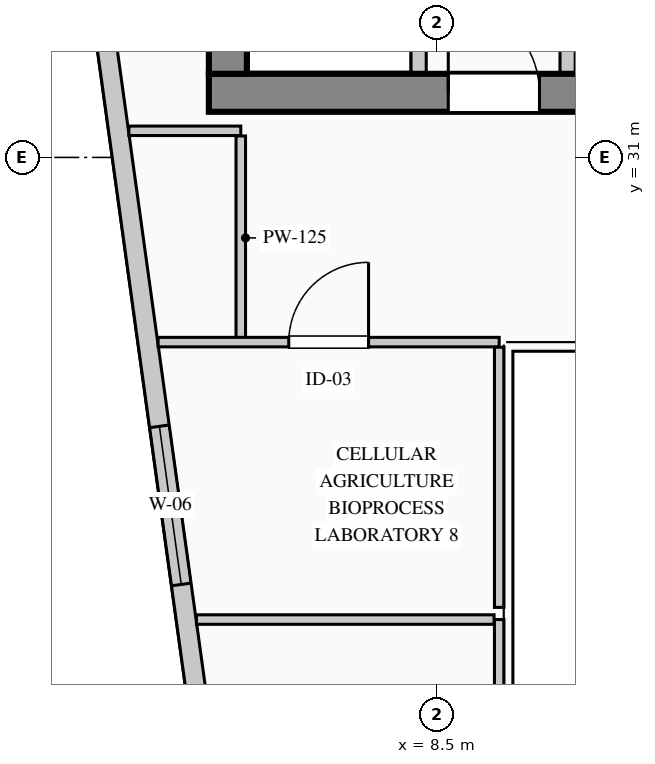
"""IFC4 building model, lengths in metres.
Left out: names, types, materials, properties, quantities, classifications, styles, units other than length and angle.
Written with IfcOpenShell. Run it as: python <this file> out.ifc"""

import sys

from ifc_helpers import new_model, si_unit, direction, frame, frame_2d, origin, place, context, subcontext, project, spatial, rectangle, extrude, element, fill, save


model = new_model("IFC4")
c1 = context("Model", 3, precision=1e-05, world=origin(), true_north=direction((0.0, 1.0)))
c2 = subcontext(c1, "Body", "Model", "MODEL_VIEW")
j1 = project(units=[si_unit("LENGTHUNIT", "METRE"), si_unit("PLANEANGLEUNIT", "RADIAN")], contexts=[c1])
p1 = place(None, origin())
s1 = spatial("IfcSite", under=j1, at=p1, CompositionType="ELEMENT")
p2 = place(p1, origin())
s2 = spatial("IfcBuilding", under=s1, at=p2, CompositionType="ELEMENT")
p3 = place(p2, frame((0.0, 0.0, 135.1)))
s3 = spatial("IfcBuildingStorey", under=s2, at=p3, CompositionType="ELEMENT", Elevation=135.1)
p4 = place(p3, frame((5.5, 31.85, 0.0), z_axis=(0.0, 0.0, 1.0), x_axis=(1.0, 0.0, 0.0)))
e1 = element("IfcWall", 1, at=p4, inside=s3, PredefinedType="SHEAR", context=c2, shape_type="SweptSolid", body=[
    extrude(rectangle(XDim=17.85, YDim=0.5, at=frame_2d((8.925, 0.0))), origin(), (0.0, 0.0, 1.0), 3.95),
])
p5 = place(p4, frame((3.15, 0.0, 0.0)))
e2 = element("IfcOpeningElement", 2, at=p5, cuts=e1, PredefinedType="OPENING", context=c2, shape_type="SweptSolid", body=[
    extrude(rectangle(XDim=1.2, YDim=2.2, at=frame_2d((0.6, 1.1))), frame((0.0, 0.26, 0.0), z_axis=(0.0, -1.0, 0.0), x_axis=(1.0, 0.0, 0.0)), (0.0, 0.0, 1.0), 0.52),
])
p6 = place(p4, frame((7.0, 0.0, 0.0)))
e3 = element("IfcOpeningElement", 3, at=p6, cuts=e1, PredefinedType="OPENING", context=c2, shape_type="SweptSolid", body=[
    extrude(rectangle(XDim=1.2, YDim=2.2, at=frame_2d((0.6, 1.1))), frame((0.0, 0.26, 0.0), z_axis=(0.0, -1.0, 0.0), x_axis=(1.0, 0.0, 0.0)), (0.0, 0.0, 1.0), 0.52),
])
p7 = place(p4, frame((8.85, 0.0, 0.0)))
e4 = element("IfcOpeningElement", 4, at=p7, cuts=e1, PredefinedType="OPENING", context=c2, shape_type="SweptSolid", body=[
    extrude(rectangle(XDim=1.15, YDim=2.2, at=frame_2d((0.575, 1.1))), frame((0.0, 0.26, 0.0), z_axis=(0.0, -1.0, 0.0), x_axis=(1.0, 0.0, 0.0)), (0.0, 0.0, 1.0), 0.52),
])
p8 = place(p4, frame((15.95, 0.0, 0.0)))
e5 = element("IfcOpeningElement", 5, at=p8, cuts=e1, PredefinedType="OPENING", context=c2, shape_type="SweptSolid", body=[
    extrude(rectangle(XDim=1.2, YDim=2.2, at=frame_2d((0.6, 1.1))), frame((0.0, 0.26, 0.0), z_axis=(0.0, -1.0, 0.0), x_axis=(1.0, 0.0, 0.0)), (0.0, 0.0, 1.0), 0.52),
])
p9 = place(p3, frame((5.75, 32.1, 0.0), z_axis=(0.0, 0.0, 1.0), x_axis=(0.0, 1.0, 0.0)))
e6 = element("IfcWall", 6, at=p9, inside=s3, PredefinedType="SHEAR", context=c2, shape_type="SweptSolid", body=[
    extrude(rectangle(XDim=8.3, YDim=0.5, at=frame_2d((4.15, 0.0))), origin(), (0.0, 0.0, 1.0), 3.95),
])
p10 = place(p3, frame((7.993, 4.73, 0.0), z_axis=(0.0, 0.0, 1.0), x_axis=(-0.136989009016, 0.990572567462, 0.0)))
e7 = element("IfcWall", 7, at=p10, inside=s3, PredefinedType="STANDARD", context=c2, shape_type="SweptSolid", body=[
    extrude(rectangle(XDim=36.888, YDim=0.26, at=frame_2d((18.444, 0.0))), origin(), (0.0, 0.0, 1.0), 3.69),
])
p11 = place(p10, frame((20.848, 0.0, 0.9)))
e8 = element("IfcOpeningElement", 8, at=p11, cuts=e7, PredefinedType="OPENING", context=c2, shape_type="SweptSolid", body=[
    extrude(rectangle(XDim=2.1, YDim=2.0, at=frame_2d((1.05, 1.0))), frame((0.0, 0.14, 0.0), z_axis=(0.0, -1.0, 0.0), x_axis=(1.0, 0.0, 0.0)), (0.0, 0.0, 1.0), 0.28),
])
p12 = place(p3, frame((8.26, 32.12, 0.0), z_axis=(0.0, 0.0, 1.0), x_axis=(0.0, 1.0, 0.0)))
e9 = element("IfcWall", 9, at=p12, inside=s3, PredefinedType="PARTITIONING", context=c2, shape_type="SweptSolid", body=[
    extrude(rectangle(XDim=7.5, YDim=0.2, at=frame_2d((3.75, 0.0))), origin(), (0.0, 0.0, 1.0), 3.69),
])
p13 = place(p3, frame((10.22, 32.12, 0.0), z_axis=(0.0, 0.0, 1.0), x_axis=(0.0, 1.0, 0.0)))
e10 = element("IfcWall", 10, at=p13, inside=s3, PredefinedType="PARTITIONING", context=c2, shape_type="SweptSolid", body=[
    extrude(rectangle(XDim=8.26, YDim=0.2, at=frame_2d((4.13, 0.0))), origin(), (0.0, 0.0, 1.0), 3.69),
])
p14 = place(p3, frame((9.32, 24.92, 0.0), z_axis=(0.0, 0.0, 1.0), x_axis=(0.0, -1.0, 0.0)))
e11 = element("IfcWall", 11, at=p14, inside=s3, PredefinedType="PARTITIONING", context=c2, shape_type="SweptSolid", body=[
    extrude(rectangle(XDim=5.17, YDim=0.125, at=frame_2d((2.585, 0.0))), origin(), (0.0, 0.0, 1.0), 3.475),
])
p15 = place(p3, frame((5.337, 24.92, 0.0), z_axis=(0.0, 0.0, 1.0), x_axis=(1.0, 0.0, 0.0)))
e12 = element("IfcWall", 12, at=p15, inside=s3, PredefinedType="PARTITIONING", context=c2, shape_type="SweptSolid", body=[
    extrude(rectangle(XDim=3.916, YDim=0.125, at=frame_2d((1.958, 0.0))), origin(), (0.0, 0.0, 1.0), 3.69),
])
p16 = place(p3, frame((4.448, 31.35, 0.0), z_axis=(0.0, 0.0, 1.0), x_axis=(1.0, 0.0, 0.0)))
e13 = element("IfcWall", 13, at=p16, inside=s3, PredefinedType="PARTITIONING", context=c2, shape_type="SweptSolid", body=[
    extrude(rectangle(XDim=1.472, YDim=0.125, at=frame_2d((0.736, 0.0))), origin(), (0.0, 0.0, 1.0), 3.69),
])
p17 = place(p3, frame((5.92, 31.282, 0.0), z_axis=(0.0, 0.0, 1.0), x_axis=(0.0, -1.0, 0.0)))
e14 = element("IfcWall", 14, at=p17, inside=s3, PredefinedType="PARTITIONING", context=c2, shape_type="SweptSolid", body=[
    extrude(rectangle(XDim=2.682, YDim=0.125, at=frame_2d((1.341, 0.0))), origin(), (0.0, 0.0, 1.0), 3.69),
])
p18 = place(p3, frame((4.832, 28.57, 0.0), z_axis=(0.0, 0.0, 1.0), x_axis=(1.0, 0.0, 0.0)))
e15 = element("IfcWall", 15, at=p18, inside=s3, PredefinedType="PARTITIONING", context=c2, shape_type="SweptSolid", body=[
    extrude(rectangle(XDim=4.488, YDim=0.125, at=frame_2d((2.244, 0.0))), origin(), (0.0, 0.0, 1.0), 3.69),
])
p19 = place(p18, frame((1.719, 0.0, 0.0)))
e16 = element("IfcOpeningElement", 16, at=p19, cuts=e15, PredefinedType="OPENING", context=c2, shape_type="SweptSolid", body=[
    extrude(rectangle(XDim=1.05, YDim=2.15, at=frame_2d((0.525, 1.075))), frame((0.0, 0.073, 0.0), z_axis=(0.0, -1.0, 0.0), x_axis=(1.0, 0.0, 0.0)), (0.0, 0.0, 1.0), 0.145),
])
p20 = place(p3, frame((9.32, 28.502, 0.0), z_axis=(0.0, 0.0, 1.0), x_axis=(0.0, -1.0, 0.0)))
e17 = element("IfcWall", 17, at=p20, inside=s3, PredefinedType="PARTITIONING", context=c2, shape_type="SweptSolid", body=[
    extrude(rectangle(XDim=3.422, YDim=0.125, at=frame_2d((1.711, 0.0))), origin(), (0.0, 0.0, 1.0), 3.475),
])
p21 = place(p11, origin())
e18 = element("IfcWindow", 18, at=p21, inside=s3, PartitioningType="DOUBLE_PANEL_VERTICAL", PredefinedType="WINDOW", context=c2, shape_type="SweptSolid", body=[
    extrude(rectangle(XDim=2.1, YDim=2.0, at=frame_2d((1.05, 1.0))), frame((0.0, 0.03, 0.0), z_axis=(0.0, -1.0, 0.0), x_axis=(1.0, 0.0, 0.0)), (0.0, 0.0, 1.0), 0.06),
])
fill(e8, e18)
p22 = place(p5, origin())
e19 = element("IfcDoor", 19, at=p22, inside=s3, OperationType="SINGLE_SWING_LEFT", PredefinedType="DOOR", context=c2, shape_type="SweptSolid", body=[
    extrude(rectangle(XDim=1.2, YDim=2.2, at=frame_2d((0.6, 1.1))), frame((0.0, 0.025, 0.0), z_axis=(0.0, -1.0, 0.0), x_axis=(1.0, 0.0, 0.0)), (0.0, 0.0, 1.0), 0.05),
])
fill(e2, e19)
p23 = place(p19, origin())
e20 = element("IfcDoor", 20, at=p23, inside=s3, OperationType="SINGLE_SWING_RIGHT", PredefinedType="DOOR", context=c2, shape_type="SweptSolid", body=[
    extrude(rectangle(XDim=1.05, YDim=2.15, at=frame_2d((0.525, 1.075))), frame((0.0, 0.025, 0.0), z_axis=(0.0, -1.0, 0.0), x_axis=(1.0, 0.0, 0.0)), (0.0, 0.0, 1.0), 0.05),
])
fill(e16, e20)
save(model, sys.argv[1])
